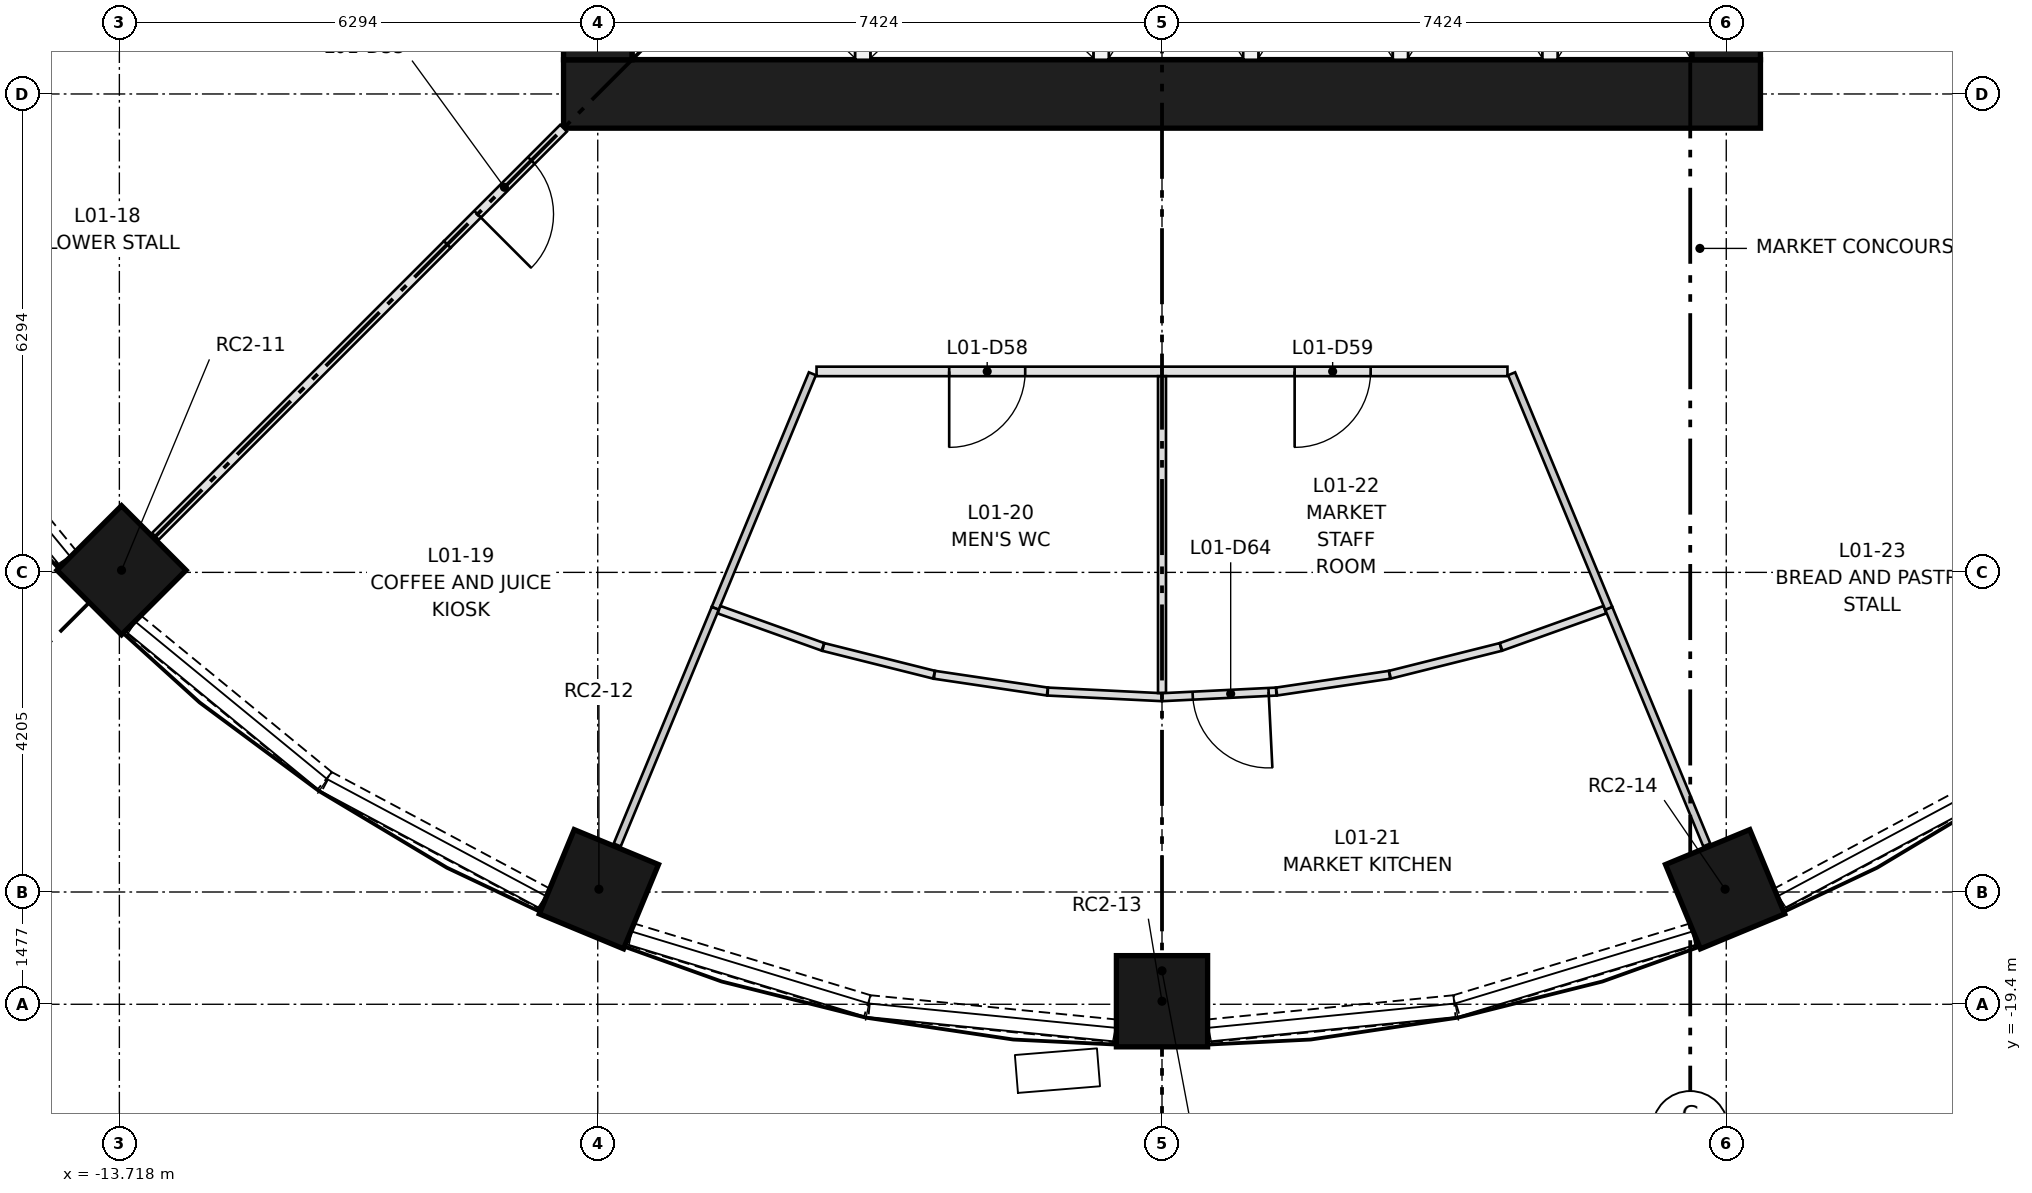
"""IFC4 building model, lengths in metres.
Left out: names, types, materials, properties, quantities, classifications, styles, units other than length and angle.
Written with IfcOpenShell. Run it as: python <this file> out.ifc"""

import sys

from ifc_helpers import new_model, si_unit, direction, frame, frame_2d, origin, origin_2d, place, context, subcontext, project, spatial, rectangle, extrude, element, fill, save


model = new_model("IFC4")
c1 = context("Model", 3, precision=1e-05, world=origin(), true_north=direction((0.0, 1.0)))
c2 = subcontext(c1, "Body", "Model", "MODEL_VIEW")
j1 = project(units=[si_unit("LENGTHUNIT", "METRE"), si_unit("PLANEANGLEUNIT", "RADIAN")], contexts=[c1])
p1 = place(None, origin())
s1 = spatial("IfcSite", under=j1, at=p1, CompositionType="ELEMENT")
p2 = place(p1, origin())
s2 = spatial("IfcBuilding", under=s1, at=p2, CompositionType="ELEMENT")
p3 = place(p2, frame((0.0, 0.0, 5.2)))
s3 = spatial("IfcBuildingStorey", under=s2, at=p3, CompositionType="ELEMENT", Elevation=5.2)
for number, where, z_axis, x_axis in (
    (1, (-13.69, -13.69, 0.0), (0.0, 0.0, 1.0), (-0.707, -0.707, 0.0)),
    (2, (-7.409, -17.886, 0.0), (0.0, 0.0, 1.0), (-0.383, -0.924, 0.0)),
    (3, (0.0, -19.36, 0.0), (0.0, 0.0, 1.0), (0.0, -1.0, 0.0)),
    (4, (7.409, -17.886, 0.0), (0.0, 0.0, 1.0), (0.383, -0.924, 0.0)),
):
    element("IfcColumn", number, at=place(p3, frame(where, z_axis=z_axis, x_axis=x_axis)), inside=s3, PredefinedType="COLUMN", context=c2, shape_type="SweptSolid", body=[
        extrude(rectangle(XDim=1.2, YDim=1.2, at=origin_2d()), origin(), (0.0, 0.0, 1.0), 4.7),
    ])
p4 = place(p3, frame((-7.874, -7.424, 0.0), z_axis=(0.0, 0.0, 1.0), x_axis=(1.0, 0.0, 0.0)))
e5 = element("IfcWall", 5, at=p4, inside=s3, PredefinedType="SHEAR", context=c2, shape_type="SweptSolid", body=[
    extrude(rectangle(XDim=15.748, YDim=0.9, at=frame_2d((7.874, 0.0))), origin(), (0.0, 0.0, 1.0), 4.7),
])
p5 = place(p3, frame((-7.424, -6.974, 0.0), z_axis=(0.0, 0.0, 1.0), x_axis=(0.0, 1.0, 0.0)))
e6 = element("IfcWall", 6, at=p5, inside=s3, PredefinedType="SHEAR", context=c2, shape_type="SweptSolid", body=[
    extrude(rectangle(XDim=13.948, YDim=0.9, at=frame_2d((6.974, 0.0))), origin(), (0.0, 0.0, 1.0), 4.7),
])
p6 = place(p5, frame((6.474, 0.0, 0.0)))
e7 = element("IfcOpeningElement", 7, at=p6, cuts=e6, PredefinedType="OPENING", context=c2, shape_type="SweptSolid", body=[
    extrude(rectangle(XDim=1.0, YDim=2.1, at=frame_2d((0.5, 1.05))), frame((0.0, 0.46, 0.0), z_axis=(0.0, -1.0, 0.0), x_axis=(1.0, 0.0, 0.0)), (0.0, 0.0, 1.0), 0.92),
])
p7 = place(p5, frame((3.35, 0.0, 0.0)))
e8 = element("IfcOpeningElement", 8, at=p7, cuts=e6, PredefinedType="OPENING", context=c2, shape_type="SweptSolid", body=[
    extrude(rectangle(XDim=1.8, YDim=2.1, at=frame_2d((0.9, 1.05))), frame((0.0, 0.46, 0.0), z_axis=(0.0, -1.0, 0.0), x_axis=(1.0, 0.0, 0.0)), (0.0, 0.0, 1.0), 0.92),
])
p8 = place(p5, frame((8.799, 0.0, 0.0)))
e9 = element("IfcOpeningElement", 9, at=p8, cuts=e6, PredefinedType="OPENING", context=c2, shape_type="SweptSolid", body=[
    extrude(rectangle(XDim=1.8, YDim=2.1, at=frame_2d((0.9, 1.05))), frame((0.0, 0.46, 0.0), z_axis=(0.0, -1.0, 0.0), x_axis=(1.0, 0.0, 0.0)), (0.0, 0.0, 1.0), 0.92),
])
p9 = place(p5, frame((11.974, 0.0, 0.0)))
e10 = element("IfcOpeningElement", 10, at=p9, cuts=e6, PredefinedType="OPENING", context=c2, shape_type="SweptSolid", body=[
    extrude(rectangle(XDim=1.0, YDim=2.1, at=frame_2d((0.5, 1.05))), frame((0.0, 0.46, 0.0), z_axis=(0.0, -1.0, 0.0), x_axis=(1.0, 0.0, 0.0)), (0.0, 0.0, 1.0), 0.92),
])
p10 = place(p3, frame((7.424, -6.974, 0.0), z_axis=(0.0, 0.0, 1.0), x_axis=(0.0, 1.0, 0.0)))
e11 = element("IfcWall", 11, at=p10, inside=s3, PredefinedType="SHEAR", context=c2, shape_type="SweptSolid", body=[
    extrude(rectangle(XDim=13.948, YDim=0.9, at=frame_2d((6.974, 0.0))), origin(), (0.0, 0.0, 1.0), 4.7),
])
p11 = place(p10, frame((6.474, 0.0, 0.0)))
e12 = element("IfcOpeningElement", 12, at=p11, cuts=e11, PredefinedType="OPENING", context=c2, shape_type="SweptSolid", body=[
    extrude(rectangle(XDim=1.0, YDim=2.1, at=frame_2d((0.5, 1.05))), frame((0.0, 0.46, 0.0), z_axis=(0.0, -1.0, 0.0), x_axis=(1.0, 0.0, 0.0)), (0.0, 0.0, 1.0), 0.92),
])
p12 = place(p10, frame((3.35, 0.0, 0.0)))
e13 = element("IfcOpeningElement", 13, at=p12, cuts=e11, PredefinedType="OPENING", context=c2, shape_type="SweptSolid", body=[
    extrude(rectangle(XDim=1.8, YDim=2.1, at=frame_2d((0.9, 1.05))), frame((0.0, 0.46, 0.0), z_axis=(0.0, -1.0, 0.0), x_axis=(1.0, 0.0, 0.0)), (0.0, 0.0, 1.0), 0.92),
])
p13 = place(p10, frame((8.799, 0.0, 0.0)))
e14 = element("IfcOpeningElement", 14, at=p13, cuts=e11, PredefinedType="OPENING", context=c2, shape_type="SweptSolid", body=[
    extrude(rectangle(XDim=1.8, YDim=2.1, at=frame_2d((0.9, 1.05))), frame((0.0, 0.46, 0.0), z_axis=(0.0, -1.0, 0.0), x_axis=(1.0, 0.0, 0.0)), (0.0, 0.0, 1.0), 0.92),
])
for number, where, z_axis, x_axis in (
    (15, (-3.937, -6.974, 0.0), (0.0, 0.0, 1.0), (0.0, 1.0, 0.0)),
    (16, (-0.8, -6.974, 0.0), (0.0, 0.0, 1.0), (0.0, 1.0, 0.0)),
    (17, (1.168, -6.974, 0.0), (0.0, 0.0, 1.0), (0.0, 1.0, 0.0)),
    (18, (3.137, -6.974, 0.0), (0.0, 0.0, 1.0), (0.0, 1.0, 0.0)),
    (19, (5.105, -6.974, 0.0), (0.0, 0.0, 1.0), (0.0, 1.0, 0.0)),
):
    element("IfcWall", number, at=place(p3, frame(where, z_axis=z_axis, x_axis=x_axis)), inside=s3, PredefinedType="PARTITIONING", context=c2, shape_type="SweptSolid", body=[
        extrude(rectangle(XDim=2.8, YDim=0.2, at=frame_2d((1.4, 0.0))), origin(), (0.0, 0.0, 1.0), 4.3),
    ])
for number, where, z_axis, x_axis in (
    (20, (-16.461, -11.018, 0.0), (0.0, 0.0, 1.0), (0.634, -0.773, 0.0)),
    (21, (-13.531, -14.399, 0.0), (0.0, 0.0, 1.0), (0.773, -0.634, 0.0)),
):
    element("IfcWall", number, at=place(p3, frame(where, z_axis=z_axis, x_axis=x_axis)), inside=s3, PredefinedType="SOLIDWALL", context=c2, shape_type="SweptSolid", body=[
        extrude(rectangle(XDim=3.251, YDim=0.3, at=frame_2d((1.626, 0.0))), origin(), (0.0, 0.0, 1.0), 0.45),
    ])
p14 = place(p3, frame((-10.993, -16.478, 0.0), z_axis=(0.0, 0.0, 1.0), x_axis=(0.881968250723, -0.471308820961, 0.0)))
e22 = element("IfcWall", 22, at=p14, inside=s3, PredefinedType="SOLIDWALL", context=c2, shape_type="SweptSolid", body=[
    extrude(rectangle(XDim=3.252, YDim=0.3, at=frame_2d((1.626, 0.0))), origin(), (0.0, 0.0, 1.0), 0.45),
])
p15 = place(p3, frame((-6.99, -18.48, 0.0), z_axis=(0.0, 0.0, 1.0), x_axis=(0.956935334366, -0.290301164038, 0.0)))
e23 = element("IfcWall", 23, at=p15, inside=s3, PredefinedType="SOLIDWALL", context=c2, shape_type="SweptSolid", body=[
    extrude(rectangle(XDim=3.252, YDim=0.3, at=frame_2d((1.626, 0.0))), origin(), (0.0, 0.0, 1.0), 0.45),
])
for number, where, z_axis, x_axis in (
    (24, (-3.849, -19.43, 0.0), (0.0, 0.0, 1.0), (0.995, -0.098, 0.0)),
    (25, (0.613, -19.75, 0.0), (0.0, 0.0, 1.0), (0.995, 0.098, 0.0)),
):
    element("IfcWall", number, at=place(p3, frame(where, z_axis=z_axis, x_axis=x_axis)), inside=s3, PredefinedType="SOLIDWALL", context=c2, shape_type="SweptSolid", body=[
        extrude(rectangle(XDim=3.252, YDim=0.3, at=frame_2d((1.626, 0.0))), origin(), (0.0, 0.0, 1.0), 0.45),
    ])
p16 = place(p3, frame((3.878, -19.425, 0.0), z_axis=(0.0, 0.0, 1.0), x_axis=(0.956935334366, 0.290301164038, 0.0)))
e26 = element("IfcWall", 26, at=p16, inside=s3, PredefinedType="SOLIDWALL", context=c2, shape_type="SweptSolid", body=[
    extrude(rectangle(XDim=3.252, YDim=0.3, at=frame_2d((1.626, 0.0))), origin(), (0.0, 0.0, 1.0), 0.45),
])
p17 = place(p3, frame((8.124, -18.011, 0.0), z_axis=(0.0, 0.0, 1.0), x_axis=(0.881968250723, 0.471308820961, 0.0)))
e27 = element("IfcWall", 27, at=p17, inside=s3, PredefinedType="SOLIDWALL", context=c2, shape_type="SweptSolid", body=[
    extrude(rectangle(XDim=3.252, YDim=0.3, at=frame_2d((1.626, 0.0))), origin(), (0.0, 0.0, 1.0), 0.45),
])
p18 = place(p3, frame((-7.874, -7.874, 0.0), z_axis=(0.0, 0.0, 1.0), x_axis=(-0.707106781187, -0.707106781187, 0.0)))
e28 = element("IfcWall", 28, at=p18, inside=s3, PredefinedType="PARTITIONING", context=c2, shape_type="SweptSolid", body=[
    extrude(rectangle(XDim=2.165, YDim=0.125, at=frame_2d((1.082, 0.0))), origin(), (0.0, 0.0, 1.0), 4.3),
])
p19 = place(p18, frame((0.6, 0.0, 0.0)))
e29 = element("IfcOpeningElement", 29, at=p19, cuts=e28, PredefinedType="OPENING", context=c2, shape_type="SweptSolid", body=[
    extrude(rectangle(XDim=1.0, YDim=2.1, at=frame_2d((0.5, 1.05))), frame((0.0, 0.073, 0.0), z_axis=(0.0, -1.0, 0.0), x_axis=(1.0, 0.0, 0.0)), (0.0, 0.0, 1.0), 0.145),
])
p20 = place(p3, frame((0.0, -11.074, 0.0), z_axis=(0.0, 0.0, 1.0), x_axis=(-1.0, 0.0, 0.0)))
e30 = element("IfcWall", 30, at=p20, inside=s3, PredefinedType="PARTITIONING", context=c2, shape_type="SweptSolid", body=[
    extrude(rectangle(XDim=4.545, YDim=0.125, at=frame_2d((2.272, 0.0))), origin(), (0.0, 0.0, 1.0), 4.3),
])
p21 = place(p20, frame((1.8, 0.0, 0.0)))
e31 = element("IfcOpeningElement", 31, at=p21, cuts=e30, PredefinedType="OPENING", context=c2, shape_type="SweptSolid", body=[
    extrude(rectangle(XDim=1.0, YDim=2.1, at=frame_2d((0.5, 1.05))), frame((0.0, 0.073, 0.0), z_axis=(0.0, -1.0, 0.0), x_axis=(1.0, 0.0, 0.0)), (0.0, 0.0, 1.0), 0.145),
])
p22 = place(p3, frame((4.545, -11.074, 0.0), z_axis=(0.0, 0.0, 1.0), x_axis=(-1.0, 0.0, 0.0)))
e32 = element("IfcWall", 32, at=p22, inside=s3, PredefinedType="PARTITIONING", context=c2, shape_type="SweptSolid", body=[
    extrude(rectangle(XDim=4.545, YDim=0.125, at=frame_2d((2.272, 0.0))), origin(), (0.0, 0.0, 1.0), 4.3),
])
p23 = place(p22, frame((1.8, 0.0, 0.0)))
e33 = element("IfcOpeningElement", 33, at=p23, cuts=e32, PredefinedType="OPENING", context=c2, shape_type="SweptSolid", body=[
    extrude(rectangle(XDim=1.0, YDim=2.1, at=frame_2d((0.5, 1.05))), frame((0.0, 0.073, 0.0), z_axis=(0.0, -1.0, 0.0), x_axis=(1.0, 0.0, 0.0)), (0.0, 0.0, 1.0), 0.145),
])
p24 = place(p3, frame((-14.283, -5.916, 0.0), z_axis=(0.0, 0.0, 1.0), x_axis=(-0.923865769093, -0.382716658507, 0.0)))
e34 = element("IfcWall", 34, at=p24, inside=s3, PredefinedType="PARTITIONING", context=c2, shape_type="SweptSolid", body=[
    extrude(rectangle(XDim=3.27, YDim=0.1, at=frame_2d((1.635, 0.0))), origin(), (0.0, 0.0, 1.0), 4.3),
])
p25 = place(p3, frame((-9.405, -9.405, 0.0), z_axis=(0.0, 0.0, 1.0), x_axis=(-0.707106781187, -0.707106781187, 0.0)))
e35 = element("IfcWall", 35, at=p25, inside=s3, PredefinedType="PARTITIONING", context=c2, shape_type="SweptSolid", body=[
    extrude(rectangle(XDim=5.43, YDim=0.125, at=frame_2d((2.715, 0.0))), origin(), (0.0, 0.0, 1.0), 4.3),
])
p26 = place(p3, frame((-4.6, -11.105, 0.0), z_axis=(0.0, 0.0, 1.0), x_axis=(-0.382642291007, -0.923896572747, 0.0)))
e36 = element("IfcWall", 36, at=p26, inside=s3, PredefinedType="PARTITIONING", context=c2, shape_type="SweptSolid", body=[
    extrude(rectangle(XDim=3.34, YDim=0.1, at=frame_2d((1.67, 0.0))), origin(), (0.0, 0.0, 1.0), 4.3),
])
p27 = place(p3, frame((-5.878, -14.191, 0.0), z_axis=(0.0, 0.0, 1.0), x_axis=(-0.382742094492, -0.923855231681, 0.0)))
e37 = element("IfcWall", 37, at=p27, inside=s3, PredefinedType="PARTITIONING", context=c2, shape_type="SweptSolid", body=[
    extrude(rectangle(XDim=3.37, YDim=0.1, at=frame_2d((1.685, 0.0))), origin(), (0.0, 0.0, 1.0), 4.3),
])
p28 = place(p3, frame((-4.461, -14.698, 0.0), z_axis=(0.0, 0.0, 1.0), x_axis=(-0.941528707174, 0.336932773067, 0.0)))
e38 = element("IfcWall", 38, at=p28, inside=s3, PredefinedType="PARTITIONING", context=c2, shape_type="SweptSolid", body=[
    extrude(rectangle(XDim=1.452, YDim=0.105, at=frame_2d((0.726, 0.0))), origin(), (0.0, 0.0, 1.0), 4.3),
])
for number, where, z_axis, x_axis in (
    (39, (-2.999, -15.064, 0.0), (0.0, 0.0, 1.0), (-0.97, 0.243, 0.0)),
    (40, (-1.508, -15.286, 0.0), (0.0, 0.0, 1.0), (-0.989, 0.147, 0.0)),
):
    element("IfcWall", number, at=place(p3, frame(where, z_axis=z_axis, x_axis=x_axis)), inside=s3, PredefinedType="PARTITIONING", context=c2, shape_type="SweptSolid", body=[
        extrude(rectangle(XDim=1.502, YDim=0.105, at=frame_2d((0.751, 0.0))), origin(), (0.0, 0.0, 1.0), 4.3),
    ])
p29 = place(p3, frame((0.0, -15.36, 0.0), z_axis=(0.0, 0.0, 1.0), x_axis=(-0.998790878869, 0.049160759632, 0.0)))
e41 = element("IfcWall", 41, at=p29, inside=s3, PredefinedType="PARTITIONING", context=c2, shape_type="SweptSolid", body=[
    extrude(rectangle(XDim=1.505, YDim=0.105, at=frame_2d((0.752, 0.0))), origin(), (0.0, 0.0, 1.0), 4.3),
])
p30 = place(p3, frame((0.0, -11.136, 0.0), z_axis=(0.0, 0.0, 1.0), x_axis=(0.0, -1.0, 0.0)))
e42 = element("IfcWall", 42, at=p30, inside=s3, PredefinedType="PARTITIONING", context=c2, shape_type="SweptSolid", body=[
    extrude(rectangle(XDim=4.168, YDim=0.105, at=frame_2d((2.084, 0.0))), origin(), (0.0, 0.0, 1.0), 4.3),
])
p31 = place(p3, frame((1.503, -15.286, 0.0), z_axis=(0.0, 0.0, 1.0), x_axis=(-0.998790878869, -0.049160759632, 0.0)))
e43 = element("IfcWall", 43, at=p31, inside=s3, PredefinedType="PARTITIONING", context=c2, shape_type="SweptSolid", body=[
    extrude(rectangle(XDim=1.505, YDim=0.105, at=frame_2d((0.752, 0.0))), origin(), (0.0, 0.0, 1.0), 4.3),
])
p32 = place(p31, frame((0.1, 0.0, 0.0)))
e44 = element("IfcOpeningElement", 44, at=p32, cuts=e43, PredefinedType="OPENING", context=c2, shape_type="SweptSolid", body=[
    extrude(rectangle(XDim=1.0, YDim=2.1, at=frame_2d((0.5, 1.05))), frame((0.0, 0.062, 0.0), z_axis=(0.0, -1.0, 0.0), x_axis=(1.0, 0.0, 0.0)), (0.0, 0.0, 1.0), 0.125),
])
for number, where, z_axis, x_axis in (
    (45, (1.508, -15.286, 0.0), (0.0, 0.0, 1.0), (0.989, 0.147, 0.0)),
    (46, (2.999, -15.064, 0.0), (0.0, 0.0, 1.0), (0.97, 0.243, 0.0)),
):
    element("IfcWall", number, at=place(p3, frame(where, z_axis=z_axis, x_axis=x_axis)), inside=s3, PredefinedType="PARTITIONING", context=c2, shape_type="SweptSolid", body=[
        extrude(rectangle(XDim=1.502, YDim=0.105, at=frame_2d((0.751, 0.0))), origin(), (0.0, 0.0, 1.0), 4.3),
    ])
p33 = place(p3, frame((4.461, -14.698, 0.0), z_axis=(0.0, 0.0, 1.0), x_axis=(0.941528707174, 0.336932773067, 0.0)))
e47 = element("IfcWall", 47, at=p33, inside=s3, PredefinedType="PARTITIONING", context=c2, shape_type="SweptSolid", body=[
    extrude(rectangle(XDim=1.452, YDim=0.105, at=frame_2d((0.726, 0.0))), origin(), (0.0, 0.0, 1.0), 4.3),
])
p34 = place(p3, frame((5.878, -14.191, 0.0), z_axis=(0.0, 0.0, 1.0), x_axis=(0.382742094492, -0.923855231681, 0.0)))
e48 = element("IfcWall", 48, at=p34, inside=s3, PredefinedType="PARTITIONING", context=c2, shape_type="SweptSolid", body=[
    extrude(rectangle(XDim=3.37, YDim=0.1, at=frame_2d((1.685, 0.0))), origin(), (0.0, 0.0, 1.0), 4.3),
])
p35 = place(p3, frame((4.6, -11.105, 0.0), z_axis=(0.0, 0.0, 1.0), x_axis=(0.382642291007, -0.923896572747, 0.0)))
e49 = element("IfcWall", 49, at=p35, inside=s3, PredefinedType="PARTITIONING", context=c2, shape_type="SweptSolid", body=[
    extrude(rectangle(XDim=3.34, YDim=0.1, at=frame_2d((1.67, 0.0))), origin(), (0.0, 0.0, 1.0), 4.3),
])
p36 = place(p19, origin())
e50 = element("IfcDoor", 50, at=p36, inside=s3, OperationType="SINGLE_SWING_RIGHT", PredefinedType="DOOR", context=c2, shape_type="SweptSolid", body=[
    extrude(rectangle(XDim=1.0, YDim=2.1, at=frame_2d((0.5, 1.05))), frame((0.0, 0.025, 0.0), z_axis=(0.0, -1.0, 0.0), x_axis=(1.0, 0.0, 0.0)), (0.0, 0.0, 1.0), 0.05),
])
fill(e29, e50)
p37 = place(p21, origin())
e51 = element("IfcDoor", 51, at=p37, inside=s3, OperationType="SINGLE_SWING_RIGHT", PredefinedType="DOOR", context=c2, shape_type="SweptSolid", body=[
    extrude(rectangle(XDim=1.0, YDim=2.1, at=frame_2d((0.5, 1.05))), frame((0.0, 0.025, 0.0), z_axis=(0.0, -1.0, 0.0), x_axis=(1.0, 0.0, 0.0)), (0.0, 0.0, 1.0), 0.05),
])
fill(e31, e51)
p38 = place(p23, origin())
e52 = element("IfcDoor", 52, at=p38, inside=s3, OperationType="SINGLE_SWING_RIGHT", PredefinedType="DOOR", context=c2, shape_type="SweptSolid", body=[
    extrude(rectangle(XDim=1.0, YDim=2.1, at=frame_2d((0.5, 1.05))), frame((0.0, 0.025, 0.0), z_axis=(0.0, -1.0, 0.0), x_axis=(1.0, 0.0, 0.0)), (0.0, 0.0, 1.0), 0.05),
])
fill(e33, e52)
p39 = place(p32, origin())
e53 = element("IfcDoor", 53, at=p39, inside=s3, OperationType="SINGLE_SWING_LEFT", PredefinedType="DOOR", context=c2, shape_type="SweptSolid", body=[
    extrude(rectangle(XDim=1.0, YDim=2.1, at=frame_2d((0.5, 1.05))), frame((0.0, 0.025, 0.0), z_axis=(0.0, -1.0, 0.0), x_axis=(1.0, 0.0, 0.0)), (0.0, 0.0, 1.0), 0.05),
])
fill(e44, e53)
save(model, sys.argv[1])
